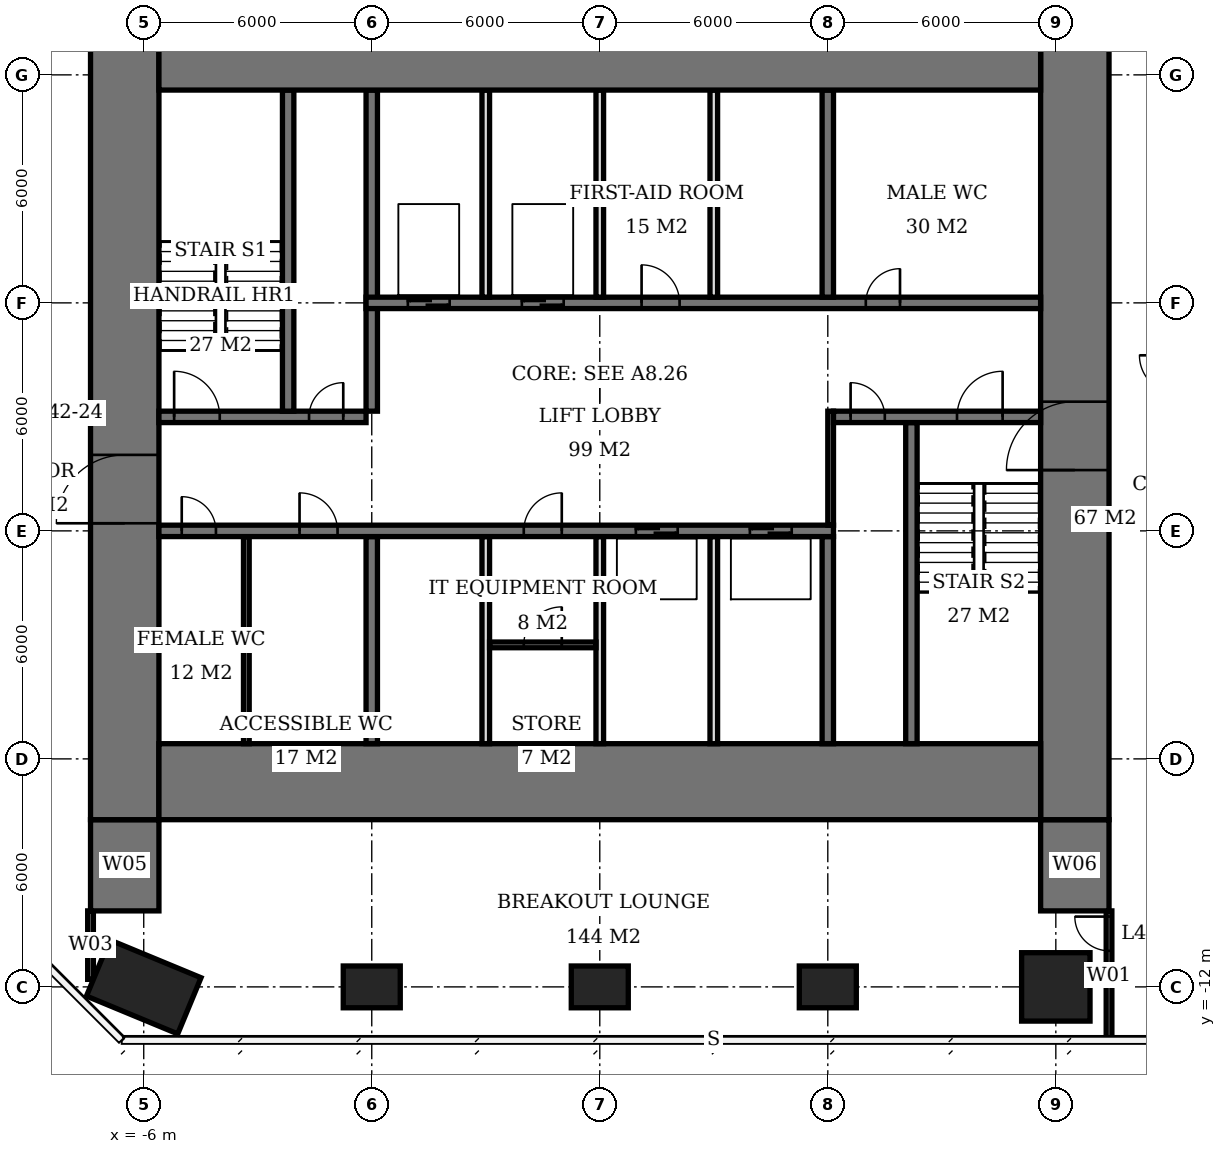
"""IFC4 building model, lengths in metres.
Left out: names, types, materials, properties, quantities, classifications, styles, units other than length and angle.
Written with IfcOpenShell. Run it as: python <this file> out.ifc"""

import sys

from ifc_helpers import new_model, si_unit, direction, frame, frame_2d, origin, origin_2d, place, context, subcontext, project, spatial, rectangle, extrude, element, fill, save


model = new_model("IFC4")
c1 = context("Model", 3, precision=1e-05, world=origin(), true_north=direction((0.0, 1.0)))
c2 = subcontext(c1, "Body", "Model", "MODEL_VIEW")
j1 = project(units=[si_unit("LENGTHUNIT", "METRE"), si_unit("PLANEANGLEUNIT", "RADIAN")], contexts=[c1])
p1 = place(None, origin())
s1 = spatial("IfcSite", under=j1, at=p1, CompositionType="ELEMENT")
p2 = place(p1, origin())
s2 = spatial("IfcBuilding", under=s1, at=p2, CompositionType="ELEMENT")
p3 = place(p2, frame((0.0, 0.0, 173.3)))
s3 = spatial("IfcBuildingStorey", under=s2, at=p3, CompositionType="ELEMENT", Elevation=173.3)
p4 = place(p3, frame((-6.0, -12.0, 0.0), z_axis=(0.0, 0.0, 1.0), x_axis=(-0.923879532511, 0.382683432365, 0.0)))
e1 = element("IfcColumn", 1, at=p4, inside=s3, PredefinedType="COLUMN", context=c2, shape_type="SweptSolid", body=[
    extrude(rectangle(XDim=2.6, YDim=1.6, at=origin_2d()), origin(), (0.0, 0.0, 1.0), 3.9),
])
for number, where, z_axis, x_axis in (
    (2, (0.0, -12.0, 0.0), (0.0, 0.0, 1.0), (1.0, 0.0, 0.0)),
    (3, (6.0, -12.0, 0.0), (0.0, 0.0, 1.0), (1.0, 0.0, 0.0)),
    (4, (12.0, -12.0, 0.0), (0.0, 0.0, 1.0), (1.0, 0.0, 0.0)),
):
    element("IfcColumn", number, at=place(p3, frame(where, z_axis=z_axis, x_axis=x_axis)), inside=s3, PredefinedType="COLUMN", context=c2, shape_type="SweptSolid", body=[
        extrude(rectangle(XDim=1.5, YDim=1.1, at=origin_2d()), origin(), (0.0, 0.0, 1.0), 3.9),
    ])
p5 = place(p3, frame((18.0, -12.0, 0.0), z_axis=(0.0, 0.0, 1.0), x_axis=(1.0, 0.0, 0.0)))
e5 = element("IfcColumn", 5, at=p5, inside=s3, PredefinedType="COLUMN", context=c2, shape_type="SweptSolid", body=[
    extrude(rectangle(XDim=1.8, YDim=1.8, at=origin_2d()), origin(), (0.0, 0.0, 1.0), 3.9),
])
for number, where, z_axis, x_axis in (
    (6, (-5.6, -6.6, 0.0), (0.0, 0.0, 1.0), (1.0, 0.0, 0.0)),
    (7, (-5.6, 12.6, 0.0), (0.0, 0.0, 1.0), (1.0, 0.0, 0.0)),
):
    element("IfcWall", number, at=place(p3, frame(where, z_axis=z_axis, x_axis=x_axis)), inside=s3, PredefinedType="SHEAR", context=c2, shape_type="SweptSolid", body=[
        extrude(rectangle(XDim=23.2, YDim=2.0, at=frame_2d((11.6, 0.0))), origin(), (0.0, 0.0, 1.0), 3.9),
    ])
p6 = place(p3, frame((-6.5, -7.6, 0.0), z_axis=(0.0, 0.0, 1.0), x_axis=(0.0, 1.0, 0.0)))
e8 = element("IfcWall", 8, at=p6, inside=s3, PredefinedType="SHEAR", context=c2, shape_type="SweptSolid", body=[
    extrude(rectangle(XDim=21.2, YDim=1.8, at=frame_2d((10.6, 0.0))), origin(), (0.0, 0.0, 1.0), 3.9),
])
p7 = place(p6, frame((7.8, 0.0, 0.0)))
e9 = element("IfcOpeningElement", 9, at=p7, cuts=e8, PredefinedType="OPENING", context=c2, shape_type="SweptSolid", body=[
    extrude(rectangle(XDim=1.8, YDim=2.4, at=frame_2d((0.9, 1.2))), frame((0.0, 0.91, 0.0), z_axis=(0.0, -1.0, 0.0), x_axis=(1.0, 0.0, 0.0)), (0.0, 0.0, 1.0), 1.82),
])
p8 = place(p3, frame((18.5, -7.6, 0.0), z_axis=(0.0, 0.0, 1.0), x_axis=(0.0, 1.0, 0.0)))
e10 = element("IfcWall", 10, at=p8, inside=s3, PredefinedType="SHEAR", context=c2, shape_type="SweptSolid", body=[
    extrude(rectangle(XDim=21.2, YDim=1.8, at=frame_2d((10.6, 0.0))), origin(), (0.0, 0.0, 1.0), 3.9),
])
p9 = place(p8, frame((9.2, 0.0, 0.0)))
e11 = element("IfcOpeningElement", 11, at=p9, cuts=e10, PredefinedType="OPENING", context=c2, shape_type="SweptSolid", body=[
    extrude(rectangle(XDim=1.8, YDim=2.4, at=frame_2d((0.9, 1.2))), frame((0.0, 0.91, 0.0), z_axis=(0.0, -1.0, 0.0), x_axis=(1.0, 0.0, 0.0)), (0.0, 0.0, 1.0), 1.82),
])
for number, where, z_axis, x_axis in (
    (12, (-6.5, -10.0, 0.0), (0.0, 0.0, 1.0), (0.0, 1.0, 0.0)),
    (13, (18.5, -10.0, 0.0), (0.0, 0.0, 1.0), (0.0, 1.0, 0.0)),
):
    element("IfcWall", number, at=place(p3, frame(where, z_axis=z_axis, x_axis=x_axis)), inside=s3, PredefinedType="SHEAR", context=c2, shape_type="SweptSolid", body=[
        extrude(rectangle(XDim=2.4, YDim=1.8, at=frame_2d((1.2, 0.0))), origin(), (0.0, 0.0, 1.0), 3.9),
    ])
p10 = place(p3, frame((-5.6, 0.0, 0.0), z_axis=(0.0, 0.0, 1.0), x_axis=(1.0, 0.0, 0.0)))
e14 = element("IfcWall", 14, at=p10, inside=s3, PredefinedType="SHEAR", context=c2, shape_type="SweptSolid", body=[
    extrude(rectangle(XDim=17.75, YDim=0.3, at=frame_2d((8.875, 0.0))), origin(), (0.0, 0.0, 1.0), 3.9),
])
p11 = place(p10, frame((0.6, 0.0, 0.0)))
e15 = element("IfcOpeningElement", 15, at=p11, cuts=e14, PredefinedType="OPENING", context=c2, shape_type="SweptSolid", body=[
    extrude(rectangle(XDim=0.9, YDim=2.1, at=frame_2d((0.45, 1.05))), frame((0.0, 0.16, 0.0), z_axis=(0.0, -1.0, 0.0), x_axis=(1.0, 0.0, 0.0)), (0.0, 0.0, 1.0), 0.32),
])
p12 = place(p10, frame((3.7, 0.0, 0.0)))
e16 = element("IfcOpeningElement", 16, at=p12, cuts=e14, PredefinedType="OPENING", context=c2, shape_type="SweptSolid", body=[
    extrude(rectangle(XDim=1.0, YDim=2.1, at=frame_2d((0.5, 1.05))), frame((0.0, 0.16, 0.0), z_axis=(0.0, -1.0, 0.0), x_axis=(1.0, 0.0, 0.0)), (0.0, 0.0, 1.0), 0.32),
])
p13 = place(p10, frame((9.6, 0.0, 0.0)))
e17 = element("IfcOpeningElement", 17, at=p13, cuts=e14, PredefinedType="OPENING", context=c2, shape_type="SweptSolid", body=[
    extrude(rectangle(XDim=1.0, YDim=2.1, at=frame_2d((0.5, 1.05))), frame((0.0, 0.16, 0.0), z_axis=(0.0, -1.0, 0.0), x_axis=(1.0, 0.0, 0.0)), (0.0, 0.0, 1.0), 0.32),
])
p14 = place(p10, frame((12.55, 0.0, 0.0)))
e18 = element("IfcOpeningElement", 18, at=p14, cuts=e14, PredefinedType="OPENING", context=c2, shape_type="SweptSolid", body=[
    extrude(rectangle(XDim=1.1, YDim=2.1, at=frame_2d((0.55, 1.05))), frame((0.0, 0.16, 0.0), z_axis=(0.0, -1.0, 0.0), x_axis=(1.0, 0.0, 0.0)), (0.0, 0.0, 1.0), 0.32),
])
p15 = place(p10, frame((15.55, 0.0, 0.0)))
e19 = element("IfcOpeningElement", 19, at=p15, cuts=e14, PredefinedType="OPENING", context=c2, shape_type="SweptSolid", body=[
    extrude(rectangle(XDim=1.1, YDim=2.1, at=frame_2d((0.55, 1.05))), frame((0.0, 0.16, 0.0), z_axis=(0.0, -1.0, 0.0), x_axis=(1.0, 0.0, 0.0)), (0.0, 0.0, 1.0), 0.32),
])
p16 = place(p3, frame((-5.6, 3.0, 0.0), z_axis=(0.0, 0.0, 1.0), x_axis=(1.0, 0.0, 0.0)))
e20 = element("IfcWall", 20, at=p16, inside=s3, PredefinedType="SHEAR", context=c2, shape_type="SweptSolid", body=[
    extrude(rectangle(XDim=5.45, YDim=0.3, at=frame_2d((2.725, 0.0))), origin(), (0.0, 0.0, 1.0), 3.9),
])
p17 = place(p16, frame((0.4, 0.0, 0.0)))
e21 = element("IfcOpeningElement", 21, at=p17, cuts=e20, PredefinedType="OPENING", context=c2, shape_type="SweptSolid", body=[
    extrude(rectangle(XDim=1.2, YDim=2.1, at=frame_2d((0.6, 1.05))), frame((0.0, 0.16, 0.0), z_axis=(0.0, -1.0, 0.0), x_axis=(1.0, 0.0, 0.0)), (0.0, 0.0, 1.0), 0.32),
])
p18 = place(p16, frame((3.95, 0.0, 0.0)))
e22 = element("IfcOpeningElement", 22, at=p18, cuts=e20, PredefinedType="OPENING", context=c2, shape_type="SweptSolid", body=[
    extrude(rectangle(XDim=0.9, YDim=2.1, at=frame_2d((0.45, 1.05))), frame((0.0, 0.16, 0.0), z_axis=(0.0, -1.0, 0.0), x_axis=(1.0, 0.0, 0.0)), (0.0, 0.0, 1.0), 0.32),
])
p19 = place(p3, frame((12.15, 3.0, 0.0), z_axis=(0.0, 0.0, 1.0), x_axis=(1.0, 0.0, 0.0)))
e23 = element("IfcWall", 23, at=p19, inside=s3, PredefinedType="SHEAR", context=c2, shape_type="SweptSolid", body=[
    extrude(rectangle(XDim=5.45, YDim=0.3, at=frame_2d((2.725, 0.0))), origin(), (0.0, 0.0, 1.0), 3.9),
])
p20 = place(p19, frame((3.25, 0.0, 0.0)))
e24 = element("IfcOpeningElement", 24, at=p20, cuts=e23, PredefinedType="OPENING", context=c2, shape_type="SweptSolid", body=[
    extrude(rectangle(XDim=1.2, YDim=2.1, at=frame_2d((0.6, 1.05))), frame((0.0, 0.16, 0.0), z_axis=(0.0, -1.0, 0.0), x_axis=(1.0, 0.0, 0.0)), (0.0, 0.0, 1.0), 0.32),
])
p21 = place(p19, frame((0.45, 0.0, 0.0)))
e25 = element("IfcOpeningElement", 25, at=p21, cuts=e23, PredefinedType="OPENING", context=c2, shape_type="SweptSolid", body=[
    extrude(rectangle(XDim=0.9, YDim=2.1, at=frame_2d((0.45, 1.05))), frame((0.0, 0.16, 0.0), z_axis=(0.0, -1.0, 0.0), x_axis=(1.0, 0.0, 0.0)), (0.0, 0.0, 1.0), 0.32),
])
p22 = place(p3, frame((-0.15, 6.0, 0.0), z_axis=(0.0, 0.0, 1.0), x_axis=(1.0, 0.0, 0.0)))
e26 = element("IfcWall", 26, at=p22, inside=s3, PredefinedType="SHEAR", context=c2, shape_type="SweptSolid", body=[
    extrude(rectangle(XDim=17.75, YDim=0.3, at=frame_2d((8.875, 0.0))), origin(), (0.0, 0.0, 1.0), 3.9),
])
p23 = place(p22, frame((13.15, 0.0, 0.0)))
e27 = element("IfcOpeningElement", 27, at=p23, cuts=e26, PredefinedType="OPENING", context=c2, shape_type="SweptSolid", body=[
    extrude(rectangle(XDim=0.9, YDim=2.1, at=frame_2d((0.45, 1.05))), frame((0.0, 0.16, 0.0), z_axis=(0.0, -1.0, 0.0), x_axis=(1.0, 0.0, 0.0)), (0.0, 0.0, 1.0), 0.32),
])
p24 = place(p22, frame((7.25, 0.0, 0.0)))
e28 = element("IfcOpeningElement", 28, at=p24, cuts=e26, PredefinedType="OPENING", context=c2, shape_type="SweptSolid", body=[
    extrude(rectangle(XDim=1.0, YDim=2.1, at=frame_2d((0.5, 1.05))), frame((0.0, 0.16, 0.0), z_axis=(0.0, -1.0, 0.0), x_axis=(1.0, 0.0, 0.0)), (0.0, 0.0, 1.0), 0.32),
])
p25 = place(p22, frame((1.1, 0.0, 0.0)))
e29 = element("IfcOpeningElement", 29, at=p25, cuts=e26, PredefinedType="OPENING", context=c2, shape_type="SweptSolid", body=[
    extrude(rectangle(XDim=1.1, YDim=2.1, at=frame_2d((0.55, 1.05))), frame((0.0, 0.16, 0.0), z_axis=(0.0, -1.0, 0.0), x_axis=(1.0, 0.0, 0.0)), (0.0, 0.0, 1.0), 0.32),
])
p26 = place(p22, frame((4.1, 0.0, 0.0)))
e30 = element("IfcOpeningElement", 30, at=p26, cuts=e26, PredefinedType="OPENING", context=c2, shape_type="SweptSolid", body=[
    extrude(rectangle(XDim=1.1, YDim=2.1, at=frame_2d((0.55, 1.05))), frame((0.0, 0.16, 0.0), z_axis=(0.0, -1.0, 0.0), x_axis=(1.0, 0.0, 0.0)), (0.0, 0.0, 1.0), 0.32),
])
p27 = place(p3, frame((0.0, -5.6, 0.0), z_axis=(0.0, 0.0, 1.0), x_axis=(0.0, 1.0, 0.0)))
e31 = element("IfcWall", 31, at=p27, inside=s3, PredefinedType="SHEAR", context=c2, shape_type="SweptSolid", body=[
    extrude(rectangle(XDim=5.45, YDim=0.3, at=frame_2d((2.725, 0.0))), origin(), (0.0, 0.0, 1.0), 3.9),
])
p28 = place(p3, frame((0.0, 3.15, 0.0), z_axis=(0.0, 0.0, 1.0), x_axis=(0.0, 1.0, 0.0)))
e32 = element("IfcWall", 32, at=p28, inside=s3, PredefinedType="SHEAR", context=c2, shape_type="SweptSolid", body=[
    extrude(rectangle(XDim=8.45, YDim=0.3, at=frame_2d((4.225, 0.0))), origin(), (0.0, 0.0, 1.0), 3.9),
])
for number, where, z_axis, x_axis in (
    (33, (12.0, -5.6, 0.0), (0.0, 0.0, 1.0), (0.0, 1.0, 0.0)),
    (34, (12.0, 6.15, 0.0), (0.0, 0.0, 1.0), (0.0, 1.0, 0.0)),
):
    element("IfcWall", number, at=place(p3, frame(where, z_axis=z_axis, x_axis=x_axis)), inside=s3, PredefinedType="SHEAR", context=c2, shape_type="SweptSolid", body=[
        extrude(rectangle(XDim=5.45, YDim=0.3, at=frame_2d((2.725, 0.0))), origin(), (0.0, 0.0, 1.0), 3.9),
    ])
for number, where, z_axis, x_axis in (
    (35, (-2.2, 3.15, 0.0), (0.0, 0.0, 1.0), (0.0, 1.0, 0.0)),
    (36, (14.2, -5.6, 0.0), (0.0, 0.0, 1.0), (0.0, 1.0, 0.0)),
):
    element("IfcWall", number, at=place(p3, frame(where, z_axis=z_axis, x_axis=x_axis)), inside=s3, PredefinedType="SHEAR", context=c2, shape_type="SweptSolid", body=[
        extrude(rectangle(XDim=8.45, YDim=0.3, at=frame_2d((4.225, 0.0))), origin(), (0.0, 0.0, 1.0), 3.9),
    ])
for number, where, z_axis, x_axis in (
    (37, (3.0, 6.15, 0.0), (0.0, 0.0, 1.0), (0.0, 1.0, 0.0)),
    (38, (6.0, 6.15, 0.0), (0.0, 0.0, 1.0), (0.0, 1.0, 0.0)),
    (39, (9.0, 6.15, 0.0), (0.0, 0.0, 1.0), (0.0, 1.0, 0.0)),
    (40, (3.0, -5.6, 0.0), (0.0, 0.0, 1.0), (0.0, 1.0, 0.0)),
    (41, (6.0, -5.6, 0.0), (0.0, 0.0, 1.0), (0.0, 1.0, 0.0)),
    (42, (9.0, -5.6, 0.0), (0.0, 0.0, 1.0), (0.0, 1.0, 0.0)),
):
    element("IfcWall", number, at=place(p3, frame(where, z_axis=z_axis, x_axis=x_axis)), inside=s3, PredefinedType="SOLIDWALL", context=c2, shape_type="SweptSolid", body=[
        extrude(rectangle(XDim=5.45, YDim=0.2, at=frame_2d((2.725, 0.0))), origin(), (0.0, 0.0, 1.0), 3.9),
    ])
p29 = place(p3, frame((-3.3, -5.6, 0.0), z_axis=(0.0, 0.0, 1.0), x_axis=(0.0, 1.0, 0.0)))
e43 = element("IfcWall", 43, at=p29, inside=s3, PredefinedType="PLUMBINGWALL", context=c2, shape_type="SweptSolid", body=[
    extrude(rectangle(XDim=5.45, YDim=0.15, at=frame_2d((2.725, 0.0))), origin(), (0.0, 0.0, 1.0), 3.65),
])
p30 = place(p3, frame((3.1, -3.0, 0.0), z_axis=(0.0, 0.0, 1.0), x_axis=(1.0, 0.0, 0.0)))
e44 = element("IfcWall", 44, at=p30, inside=s3, PredefinedType="PARTITIONING", context=c2, shape_type="SweptSolid", body=[
    extrude(rectangle(XDim=2.8, YDim=0.15, at=frame_2d((1.4, 0.0))), origin(), (0.0, 0.0, 1.0), 3.65),
])
p31 = place(p30, frame((0.9, 0.0, 0.0)))
e45 = element("IfcOpeningElement", 45, at=p31, cuts=e44, PredefinedType="OPENING", context=c2, shape_type="SweptSolid", body=[
    extrude(rectangle(XDim=1.0, YDim=2.1, at=frame_2d((0.5, 1.05))), frame((0.0, 0.085, 0.0), z_axis=(0.0, -1.0, 0.0), x_axis=(1.0, 0.0, 0.0)), (0.0, 0.0, 1.0), 0.17),
])
p32 = place(p3, frame((-7.4, -11.802, 0.0), z_axis=(0.0, 0.0, 1.0), x_axis=(0.0, 1.0, 0.0)))
e46 = element("IfcWall", 46, at=p32, inside=s3, PredefinedType="PARTITIONING", context=c2, shape_type="SweptSolid", body=[
    extrude(rectangle(XDim=1.802, YDim=0.15, at=frame_2d((0.901, 0.0))), origin(), (0.0, 0.0, 1.0), 3.65),
])
p33 = place(p3, frame((19.4, -13.4, 0.0), z_axis=(0.0, 0.0, 1.0), x_axis=(0.0, 1.0, 0.0)))
e47 = element("IfcWall", 47, at=p33, inside=s3, PredefinedType="PARTITIONING", context=c2, shape_type="SweptSolid", body=[
    extrude(rectangle(XDim=3.4, YDim=0.15, at=frame_2d((1.7, 0.0))), origin(), (0.0, 0.0, 1.0), 3.65),
])
p34 = place(p33, frame((2.35, 0.0, 0.0)))
e48 = element("IfcOpeningElement", 48, at=p34, cuts=e47, PredefinedType="OPENING", context=c2, shape_type="SweptSolid", body=[
    extrude(rectangle(XDim=0.9, YDim=2.1, at=frame_2d((0.45, 1.05))), frame((0.0, 0.085, 0.0), z_axis=(0.0, -1.0, 0.0), x_axis=(1.0, 0.0, 0.0)), (0.0, 0.0, 1.0), 0.17),
])
p35 = place(p3, frame((12.075, 0.15, 0.0), z_axis=(0.0, 0.0, 1.0), x_axis=(0.0, 1.0, 0.0)))
e49 = element("IfcWall", 49, at=p35, inside=s3, PredefinedType="PARTITIONING", context=c2, shape_type="SweptSolid", body=[
    extrude(rectangle(XDim=3.0, YDim=0.15, at=frame_2d((1.5, 0.0))), origin(), (0.0, 0.0, 1.0), 3.65),
])
p36 = place(p7, origin())
e50 = element("IfcDoor", 50, at=p36, inside=s3, OperationType="DOUBLE_DOOR_SINGLE_SWING", PredefinedType="DOOR", context=c2, shape_type="SweptSolid", body=[
    extrude(rectangle(XDim=1.8, YDim=2.4, at=frame_2d((0.9, 1.2))), frame((0.0, 0.025, 0.0), z_axis=(0.0, -1.0, 0.0), x_axis=(1.0, 0.0, 0.0)), (0.0, 0.0, 1.0), 0.05),
])
fill(e9, e50)
p37 = place(p9, origin())
e51 = element("IfcDoor", 51, at=p37, inside=s3, OperationType="DOUBLE_DOOR_SINGLE_SWING", PredefinedType="DOOR", context=c2, shape_type="SweptSolid", body=[
    extrude(rectangle(XDim=1.8, YDim=2.4, at=frame_2d((0.9, 1.2))), frame((0.0, 0.025, 0.0), z_axis=(0.0, -1.0, 0.0), x_axis=(1.0, 0.0, 0.0)), (0.0, 0.0, 1.0), 0.05),
])
fill(e11, e51)
p38 = place(p17, origin())
e52 = element("IfcDoor", 52, at=p38, inside=s3, OperationType="SINGLE_SWING_LEFT", PredefinedType="DOOR", context=c2, shape_type="SweptSolid", body=[
    extrude(rectangle(XDim=1.2, YDim=2.1, at=frame_2d((0.6, 1.05))), frame((0.0, 0.025, 0.0), z_axis=(0.0, -1.0, 0.0), x_axis=(1.0, 0.0, 0.0)), (0.0, 0.0, 1.0), 0.05),
])
fill(e21, e52)
p39 = place(p18, origin())
e53 = element("IfcDoor", 53, at=p39, inside=s3, OperationType="SINGLE_SWING_RIGHT", PredefinedType="DOOR", context=c2, shape_type="SweptSolid", body=[
    extrude(rectangle(XDim=0.9, YDim=2.1, at=frame_2d((0.45, 1.05))), frame((0.0, 0.025, 0.0), z_axis=(0.0, -1.0, 0.0), x_axis=(1.0, 0.0, 0.0)), (0.0, 0.0, 1.0), 0.05),
])
fill(e22, e53)
p40 = place(p20, origin())
e54 = element("IfcDoor", 54, at=p40, inside=s3, OperationType="SINGLE_SWING_RIGHT", PredefinedType="DOOR", context=c2, shape_type="SweptSolid", body=[
    extrude(rectangle(XDim=1.2, YDim=2.1, at=frame_2d((0.6, 1.05))), frame((0.0, 0.025, 0.0), z_axis=(0.0, -1.0, 0.0), x_axis=(1.0, 0.0, 0.0)), (0.0, 0.0, 1.0), 0.05),
])
fill(e24, e54)
p41 = place(p21, origin())
e55 = element("IfcDoor", 55, at=p41, inside=s3, OperationType="SINGLE_SWING_LEFT", PredefinedType="DOOR", context=c2, shape_type="SweptSolid", body=[
    extrude(rectangle(XDim=0.9, YDim=2.1, at=frame_2d((0.45, 1.05))), frame((0.0, 0.025, 0.0), z_axis=(0.0, -1.0, 0.0), x_axis=(1.0, 0.0, 0.0)), (0.0, 0.0, 1.0), 0.05),
])
fill(e25, e55)
p42 = place(p11, origin())
e56 = element("IfcDoor", 56, at=p42, inside=s3, OperationType="SINGLE_SWING_LEFT", PredefinedType="DOOR", context=c2, shape_type="SweptSolid", body=[
    extrude(rectangle(XDim=0.9, YDim=2.1, at=frame_2d((0.45, 1.05))), frame((0.0, 0.025, 0.0), z_axis=(0.0, -1.0, 0.0), x_axis=(1.0, 0.0, 0.0)), (0.0, 0.0, 1.0), 0.05),
])
fill(e15, e56)
p43 = place(p12, origin())
e57 = element("IfcDoor", 57, at=p43, inside=s3, OperationType="SINGLE_SWING_LEFT", PredefinedType="DOOR", context=c2, shape_type="SweptSolid", body=[
    extrude(rectangle(XDim=1.0, YDim=2.1, at=frame_2d((0.5, 1.05))), frame((0.0, 0.025, 0.0), z_axis=(0.0, -1.0, 0.0), x_axis=(1.0, 0.0, 0.0)), (0.0, 0.0, 1.0), 0.05),
])
fill(e16, e57)
p44 = place(p23, origin())
e58 = element("IfcDoor", 58, at=p44, inside=s3, OperationType="SINGLE_SWING_RIGHT", PredefinedType="DOOR", context=c2, shape_type="SweptSolid", body=[
    extrude(rectangle(XDim=0.9, YDim=2.1, at=frame_2d((0.45, 1.05))), frame((0.0, 0.025, 0.0), z_axis=(0.0, -1.0, 0.0), x_axis=(1.0, 0.0, 0.0)), (0.0, 0.0, 1.0), 0.05),
])
fill(e27, e58)
p45 = place(p24, origin())
e59 = element("IfcDoor", 59, at=p45, inside=s3, OperationType="SINGLE_SWING_LEFT", PredefinedType="DOOR", context=c2, shape_type="SweptSolid", body=[
    extrude(rectangle(XDim=1.0, YDim=2.1, at=frame_2d((0.5, 1.05))), frame((0.0, 0.025, 0.0), z_axis=(0.0, -1.0, 0.0), x_axis=(1.0, 0.0, 0.0)), (0.0, 0.0, 1.0), 0.05),
])
fill(e28, e59)
p46 = place(p31, origin())
e60 = element("IfcDoor", 60, at=p46, inside=s3, OperationType="SINGLE_SWING_RIGHT", PredefinedType="DOOR", context=c2, shape_type="SweptSolid", body=[
    extrude(rectangle(XDim=1.0, YDim=2.1, at=frame_2d((0.5, 1.05))), frame((0.0, 0.025, 0.0), z_axis=(0.0, -1.0, 0.0), x_axis=(1.0, 0.0, 0.0)), (0.0, 0.0, 1.0), 0.05),
])
fill(e45, e60)
p47 = place(p13, origin())
e61 = element("IfcDoor", 61, at=p47, inside=s3, OperationType="SINGLE_SWING_RIGHT", PredefinedType="DOOR", context=c2, shape_type="SweptSolid", body=[
    extrude(rectangle(XDim=1.0, YDim=2.1, at=frame_2d((0.5, 1.05))), frame((0.0, 0.025, 0.0), z_axis=(0.0, -1.0, 0.0), x_axis=(1.0, 0.0, 0.0)), (0.0, 0.0, 1.0), 0.05),
])
fill(e17, e61)
p48 = place(p25, origin())
e62 = element("IfcDoor", 62, at=p48, inside=s3, OperationType="DOUBLE_DOOR_SLIDING", PredefinedType="USERDEFINED", context=c2, shape_type="SweptSolid", body=[
    extrude(rectangle(XDim=1.1, YDim=2.1, at=frame_2d((0.55, 1.05))), frame((0.0, 0.025, 0.0), z_axis=(0.0, -1.0, 0.0), x_axis=(1.0, 0.0, 0.0)), (0.0, 0.0, 1.0), 0.05),
])
fill(e29, e62)
p49 = place(p26, origin())
e63 = element("IfcDoor", 63, at=p49, inside=s3, OperationType="DOUBLE_DOOR_SLIDING", PredefinedType="USERDEFINED", context=c2, shape_type="SweptSolid", body=[
    extrude(rectangle(XDim=1.1, YDim=2.1, at=frame_2d((0.55, 1.05))), frame((0.0, 0.025, 0.0), z_axis=(0.0, -1.0, 0.0), x_axis=(1.0, 0.0, 0.0)), (0.0, 0.0, 1.0), 0.05),
])
fill(e30, e63)
p50 = place(p14, origin())
e64 = element("IfcDoor", 64, at=p50, inside=s3, OperationType="DOUBLE_DOOR_SLIDING", PredefinedType="USERDEFINED", context=c2, shape_type="SweptSolid", body=[
    extrude(rectangle(XDim=1.1, YDim=2.1, at=frame_2d((0.55, 1.05))), frame((0.0, 0.025, 0.0), z_axis=(0.0, -1.0, 0.0), x_axis=(1.0, 0.0, 0.0)), (0.0, 0.0, 1.0), 0.05),
])
fill(e18, e64)
p51 = place(p15, origin())
e65 = element("IfcDoor", 65, at=p51, inside=s3, OperationType="DOUBLE_DOOR_SLIDING", PredefinedType="USERDEFINED", context=c2, shape_type="SweptSolid", body=[
    extrude(rectangle(XDim=1.1, YDim=2.1, at=frame_2d((0.55, 1.05))), frame((0.0, 0.025, 0.0), z_axis=(0.0, -1.0, 0.0), x_axis=(1.0, 0.0, 0.0)), (0.0, 0.0, 1.0), 0.05),
])
fill(e19, e65)
p52 = place(p34, origin())
e66 = element("IfcDoor", 66, at=p52, inside=s3, OperationType="SINGLE_SWING_RIGHT", PredefinedType="DOOR", context=c2, shape_type="SweptSolid", body=[
    extrude(rectangle(XDim=0.9, YDim=2.1, at=frame_2d((0.45, 1.05))), frame((0.0, 0.025, 0.0), z_axis=(0.0, -1.0, 0.0), x_axis=(1.0, 0.0, 0.0)), (0.0, 0.0, 1.0), 0.05),
])
fill(e48, e66)
save(model, sys.argv[1])
